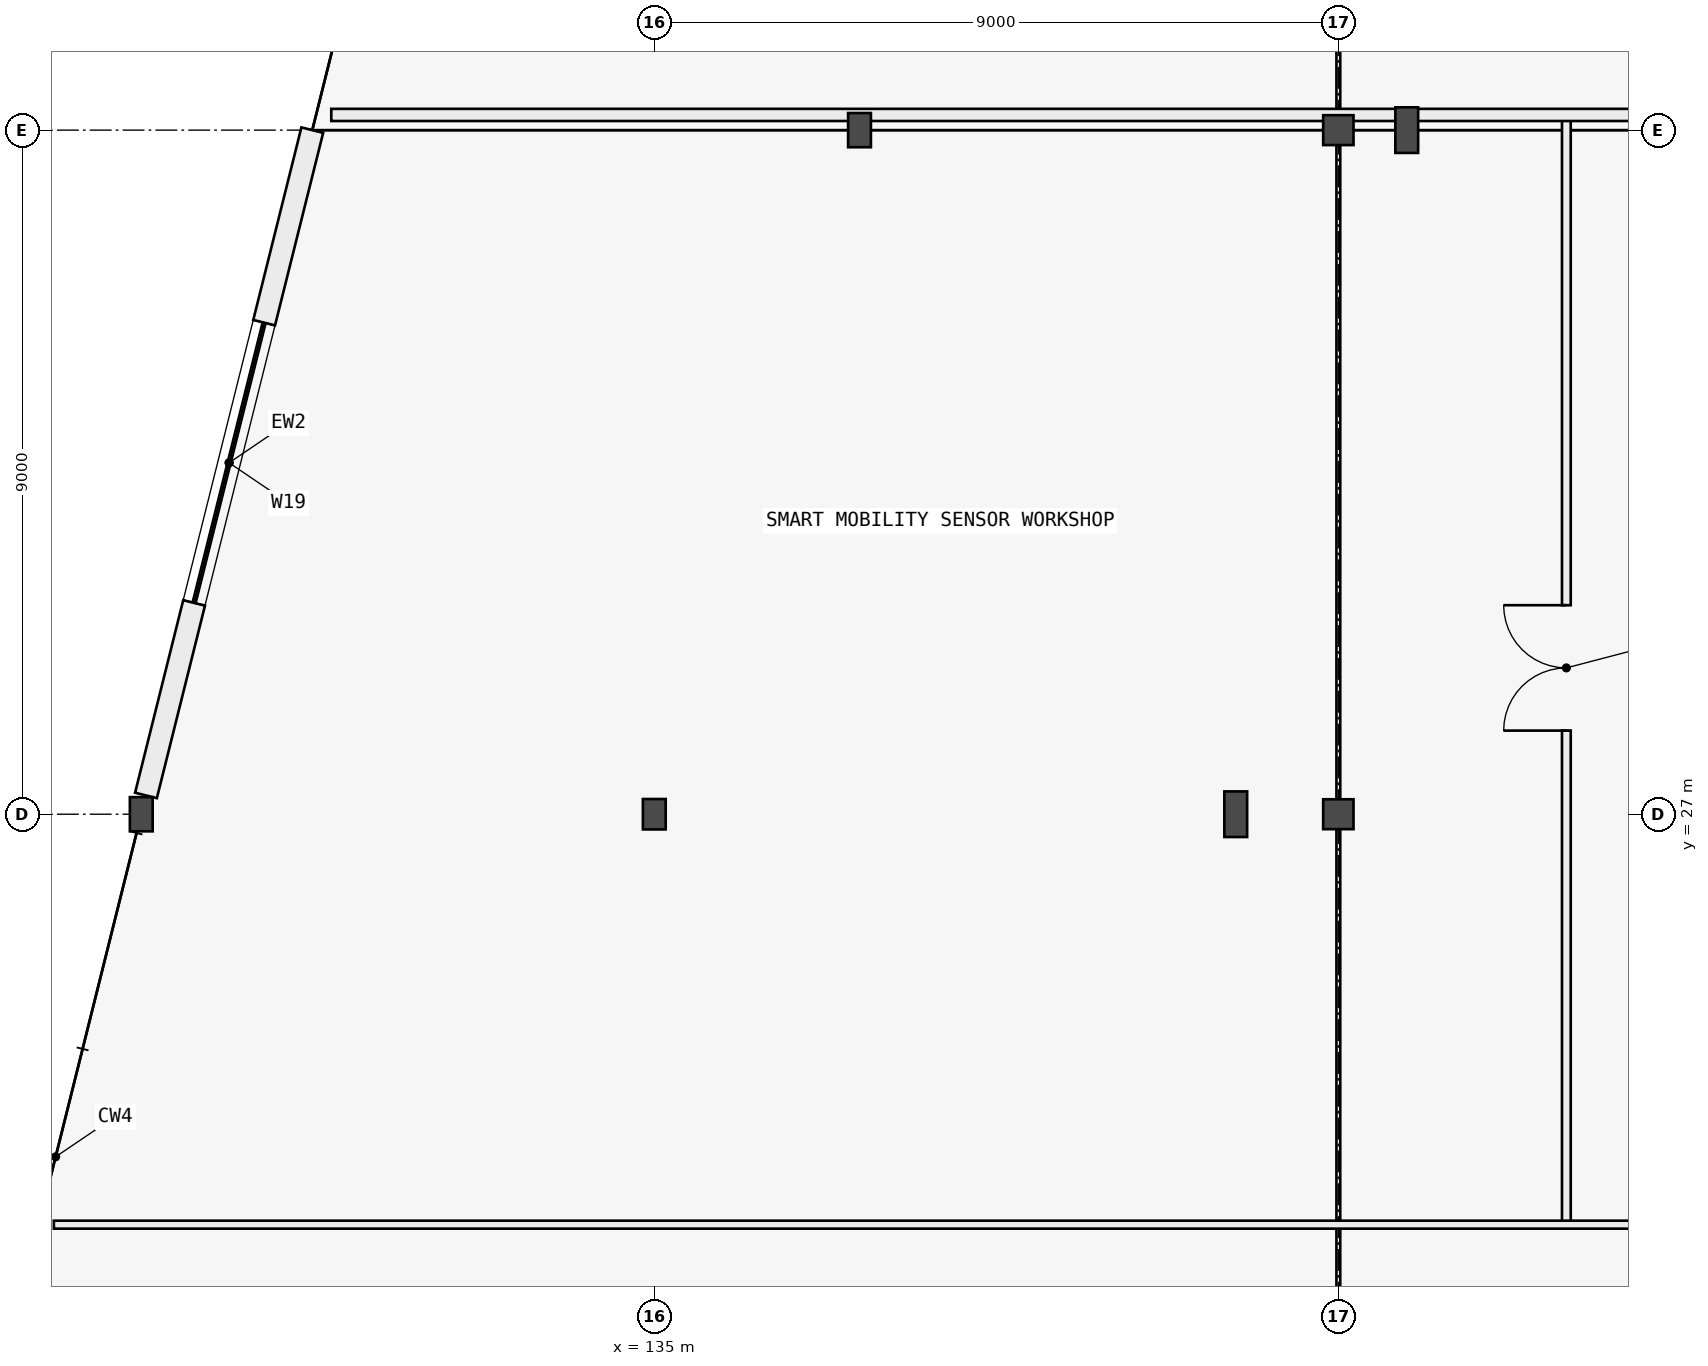
"""IFC4 building model, lengths in metres.
Left out: names, types, materials, properties, quantities, classifications, styles, units other than length and angle.
Written with IfcOpenShell. Run it as: python <this file> out.ifc"""

import sys

from ifc_helpers import new_model, si_unit, direction, frame, frame_2d, origin, origin_2d, place, context, subcontext, project, spatial, rectangle, i_section, extrude, element, fill, save


model = new_model("IFC4")
c1 = context("Model", 3, precision=1e-05, world=origin(), true_north=direction((0.0, 1.0)))
c2 = subcontext(c1, "Body", "Model", "MODEL_VIEW")
j1 = project(units=[si_unit("LENGTHUNIT", "METRE"), si_unit("PLANEANGLEUNIT", "RADIAN")], contexts=[c1])
p1 = place(None, origin())
s1 = spatial("IfcSite", under=j1, at=p1, CompositionType="ELEMENT")
p2 = place(p1, origin())
s2 = spatial("IfcBuilding", under=s1, at=p2, CompositionType="ELEMENT")
p3 = place(p2, frame((0.0, 0.0, 16.8)))
s3 = spatial("IfcBuildingStorey", under=s2, at=p3, CompositionType="ELEMENT", Elevation=16.8)
p4 = place(p3, frame((128.25, 27.0, 0.0), z_axis=(0.0, 0.0, 1.0), x_axis=(1.0, 0.0, 0.0)))
e1 = element("IfcColumn", 1, at=p4, inside=s3, PredefinedType="COLUMN", context=c2, shape_type="SweptSolid", body=[
    extrude(i_section(OverallWidth=0.3, OverallDepth=0.45, WebThickness=0.014, FlangeThickness=0.026, FilletRadius=0.027, at=origin_2d()), origin(), (0.0, 0.0, 1.0), 4.2),
])
p5 = place(p3, frame((135.0, 27.0, 0.0), z_axis=(0.0, 0.0, 1.0), x_axis=(1.0, 0.0, 0.0)))
e2 = element("IfcColumn", 2, at=p5, inside=s3, PredefinedType="COLUMN", context=c2, shape_type="SweptSolid", body=[
    extrude(i_section(OverallWidth=0.3, OverallDepth=0.4, WebThickness=0.013, FlangeThickness=0.024, FilletRadius=0.027, at=origin_2d()), origin(), (0.0, 0.0, 1.0), 4.2),
])
p6 = place(p3, frame((142.65, 27.0, 0.0), z_axis=(0.0, 0.0, 1.0), x_axis=(1.0, 0.0, 0.0)))
e3 = element("IfcColumn", 3, at=p6, inside=s3, PredefinedType="COLUMN", context=c2, shape_type="SweptSolid", body=[
    extrude(i_section(OverallWidth=0.3, OverallDepth=0.6, WebThickness=0.015, FlangeThickness=0.03, FilletRadius=0.027, at=origin_2d()), origin(), (0.0, 0.0, 1.0), 4.2),
])
p7 = place(p3, frame((144.0, 27.0, 0.0), z_axis=(0.0, 0.0, 1.0), x_axis=(1.0, 0.0, 0.0)))
e4 = element("IfcColumn", 4, at=p7, inside=s3, PredefinedType="COLUMN", context=c2, shape_type="SweptSolid", body=[
    extrude(i_section(OverallWidth=0.399, OverallDepth=0.393, WebThickness=0.018, FlangeThickness=0.028, FilletRadius=0.015, at=origin_2d()), origin(), (0.0, 0.0, 1.0), 4.2),
])
p8 = place(p3, frame((137.7, 36.0, 0.0), z_axis=(0.0, 0.0, 1.0), x_axis=(1.0, 0.0, 0.0)))
e5 = element("IfcColumn", 5, at=p8, inside=s3, PredefinedType="COLUMN", context=c2, shape_type="SweptSolid", body=[
    extrude(i_section(OverallWidth=0.3, OverallDepth=0.45, WebThickness=0.014, FlangeThickness=0.026, FilletRadius=0.027, at=origin_2d()), origin(), (0.0, 0.0, 1.0), 4.2),
])
p9 = place(p3, frame((144.0, 36.0, 0.0), z_axis=(0.0, 0.0, 1.0), x_axis=(1.0, 0.0, 0.0)))
e6 = element("IfcColumn", 6, at=p9, inside=s3, PredefinedType="COLUMN", context=c2, shape_type="SweptSolid", body=[
    extrude(i_section(OverallWidth=0.399, OverallDepth=0.393, WebThickness=0.018, FlangeThickness=0.028, FilletRadius=0.015, at=origin_2d()), origin(), (0.0, 0.0, 1.0), 4.2),
])
p10 = place(p3, frame((144.9, 36.0, 0.0), z_axis=(0.0, 0.0, 1.0), x_axis=(1.0, 0.0, 0.0)))
e7 = element("IfcColumn", 7, at=p10, inside=s3, PredefinedType="COLUMN", context=c2, shape_type="SweptSolid", body=[
    extrude(i_section(OverallWidth=0.3, OverallDepth=0.6, WebThickness=0.015, FlangeThickness=0.03, FilletRadius=0.027, at=origin_2d()), origin(), (0.0, 0.0, 1.0), 4.2),
])
p11 = place(p3, frame((128.312, 27.247, 0.0), z_axis=(0.0, 0.0, 1.0), x_axis=(0.242535625036, 0.970142500145, 0.0)))
e8 = element("IfcWall", 8, at=p11, inside=s3, PredefinedType="STANDARD", context=c2, shape_type="SweptSolid", body=[
    extrude(rectangle(XDim=9.022, YDim=0.295, at=frame_2d((4.511, 0.0))), origin(), (0.0, 0.0, 1.0), 3.955),
])
p12 = place(p11, frame((2.611, 0.0, 0.95)))
e9 = element("IfcOpeningElement", 9, at=p12, cuts=e8, PredefinedType="OPENING", context=c2, shape_type="SweptSolid", body=[
    extrude(rectangle(XDim=3.8, YDim=1.4, at=frame_2d((1.9, 0.7))), frame((0.0, 0.157, 0.0), z_axis=(0.0, -1.0, 0.0), x_axis=(1.0, 0.0, 0.0)), (0.0, 0.0, 1.0), 0.315),
])
p13 = place(p3, frame((147.0, 21.6, 0.0), z_axis=(0.0, 0.0, 1.0), x_axis=(0.0, 1.0, 0.0)))
e10 = element("IfcWall", 10, at=p13, inside=s3, PredefinedType="MOVABLE", context=c2, shape_type="SweptSolid", body=[
    extrude(rectangle(XDim=14.6, YDim=0.115, at=frame_2d((7.3, 0.0))), origin(), (0.0, 0.0, 1.0), 3.955),
])
p14 = place(p13, frame((6.5, 0.0, 0.0)))
e11 = element("IfcOpeningElement", 11, at=p14, cuts=e10, PredefinedType="OPENING", context=c2, shape_type="SweptSolid", body=[
    extrude(rectangle(XDim=1.65, YDim=2.25, at=frame_2d((0.825, 1.125))), frame((0.0, 0.067, 0.0), z_axis=(0.0, -1.0, 0.0), x_axis=(1.0, 0.0, 0.0)), (0.0, 0.0, 1.0), 0.135),
])
p15 = place(p3, frame((127.1, 21.6, 0.0), z_axis=(0.0, 0.0, 1.0), x_axis=(1.0, 0.0, 0.0)))
e12 = element("IfcWall", 12, at=p15, inside=s3, PredefinedType="MOVABLE", context=c2, shape_type="SweptSolid", body=[
    extrude(rectangle(XDim=23.1, YDim=0.105, at=frame_2d((11.55, 0.0))), origin(), (0.0, 0.0, 1.0), 3.955),
])
p16 = place(p3, frame((130.75, 36.2, 0.0), z_axis=(0.0, 0.0, 1.0), x_axis=(1.0, 0.0, 0.0)))
e13 = element("IfcWall", 13, at=p16, inside=s3, PredefinedType="PARTITIONING", context=c2, shape_type="SweptSolid", body=[
    extrude(rectangle(XDim=27.85, YDim=0.16, at=frame_2d((13.925, 0.0))), origin(), (0.0, 0.0, 1.0), 3.43),
])
p17 = place(p12, origin())
e14 = element("IfcWindow", 14, at=p17, inside=s3, PartitioningType="SINGLE_PANEL", PredefinedType="WINDOW", context=c2, shape_type="SweptSolid", body=[
    extrude(rectangle(XDim=3.8, YDim=1.4, at=frame_2d((1.9, 0.7))), frame((0.0, 0.03, 0.0), z_axis=(0.0, -1.0, 0.0), x_axis=(1.0, 0.0, 0.0)), (0.0, 0.0, 1.0), 0.06),
])
fill(e9, e14)
p18 = place(p14, origin())
e15 = element("IfcDoor", 15, at=p18, inside=s3, OperationType="DOUBLE_DOOR_SINGLE_SWING", PredefinedType="DOOR", context=c2, shape_type="SweptSolid", body=[
    extrude(rectangle(XDim=1.65, YDim=2.25, at=frame_2d((0.825, 1.125))), frame((0.0, 0.025, 0.0), z_axis=(0.0, -1.0, 0.0), x_axis=(1.0, 0.0, 0.0)), (0.0, 0.0, 1.0), 0.05),
])
fill(e11, e15)
save(model, sys.argv[1])
